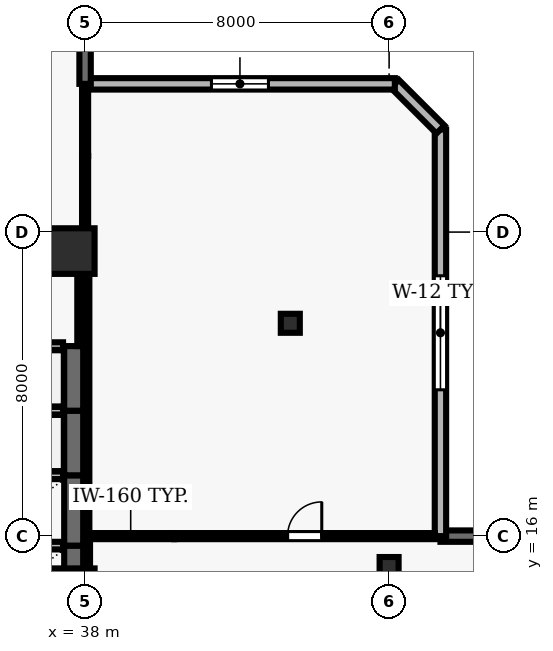
"""IFC4 building model, lengths in metres.
Left out: names, types, materials, properties, quantities, classifications, styles, units other than length and angle.
Written with IfcOpenShell. Run it as: python <this file> out.ifc"""

import sys

from ifc_helpers import new_model, si_unit, direction, frame, frame_2d, origin, origin_2d, place, context, subcontext, project, spatial, rectangle, hollow_rectangle, extrude, element, fill, save


model = new_model("IFC4")
c1 = context("Model", 3, precision=1e-05, world=origin(), true_north=direction((0.0, 1.0)))
c2 = subcontext(c1, "Body", "Model", "MODEL_VIEW")
j1 = project(units=[si_unit("LENGTHUNIT", "METRE"), si_unit("PLANEANGLEUNIT", "RADIAN")], contexts=[c1])
p1 = place(None, origin())
s1 = spatial("IfcSite", under=j1, at=p1, CompositionType="ELEMENT")
p2 = place(p1, origin())
s2 = spatial("IfcBuilding", under=s1, at=p2, CompositionType="ELEMENT")
p3 = place(p2, frame((0.0, 0.0, 126.8)))
s3 = spatial("IfcBuildingStorey", under=s2, at=p3, CompositionType="ELEMENT", Elevation=126.8)
for number, where, z_axis, x_axis in (
    (1, (37.65, 14.55, 0.0), (0.0, 0.0, 1.0), (1.0, 0.0, 0.0)),
    (2, (37.65, 23.5, 0.0), (0.0, 0.0, 1.0), (1.0, 0.0, 0.0)),
):
    element("IfcColumn", number, at=place(p3, frame(where, z_axis=z_axis, x_axis=x_axis)), inside=s3, PredefinedType="COLUMN", context=c2, shape_type="SweptSolid", body=[
        extrude(rectangle(XDim=1.2, YDim=1.2, at=origin_2d()), origin(), (0.0, 0.0, 1.0), 3.9),
    ])
for number, where, z_axis, x_axis in (
    (3, (46.0, 15.2, 0.0), (0.0, 0.0, 1.0), (1.0, 0.0, 0.0)),
    (4, (43.4, 21.6, 0.0), (0.0, 0.0, 1.0), (1.0, 0.0, 0.0)),
):
    element("IfcColumn", number, at=place(p3, frame(where, z_axis=z_axis, x_axis=x_axis)), inside=s3, PredefinedType="COLUMN", context=c2, shape_type="SweptSolid", body=[
        extrude(hollow_rectangle(XDim=0.5, YDim=0.5, WallThickness=0.025, at=origin_2d()), origin(), (0.0, 0.0, 1.0), 3.9),
    ])
p4 = place(p3, frame((68.1, 16.0, 0.0), z_axis=(0.0, 0.0, 1.0), x_axis=(-1.0, 0.0, 0.0)))
e5 = element("IfcWall", 5, at=p4, inside=s3, PredefinedType="SOLIDWALL", context=c2, shape_type="SweptSolid", body=[
    extrude(rectangle(XDim=20.749, YDim=0.3, at=frame_2d((10.375, 0.0))), origin(), (0.0, 0.0, 1.0), 3.69),
])
p5 = place(p4, frame((11.974, 0.0, 0.0)))
e6 = element("IfcOpeningElement", 6, at=p5, cuts=e5, PredefinedType="OPENING", context=c2, shape_type="SweptSolid", body=[
    extrude(rectangle(XDim=1.0, YDim=2.2, at=frame_2d((0.5, 1.1))), frame((0.0, 0.16, 0.0), z_axis=(0.0, -1.0, 0.0), x_axis=(1.0, 0.0, 0.0)), (0.0, 0.0, 1.0), 0.32),
])
p6 = place(p4, frame((2.258, 0.0, 0.9)))
e7 = element("IfcOpeningElement", 7, at=p6, cuts=e5, PredefinedType="OPENING", context=c2, shape_type="SweptSolid", body=[
    extrude(rectangle(XDim=2.4, YDim=2.2, at=frame_2d((1.2, 1.1))), frame((0.0, 0.16, 0.0), z_axis=(0.0, -1.0, 0.0), x_axis=(1.0, 0.0, 0.0)), (0.0, 0.0, 1.0), 0.32),
])
p7 = place(p4, frame((9.174, 0.0, 0.9)))
e8 = element("IfcOpeningElement", 8, at=p7, cuts=e5, PredefinedType="OPENING", context=c2, shape_type="SweptSolid", body=[
    extrude(rectangle(XDim=2.4, YDim=2.2, at=frame_2d((1.2, 1.1))), frame((0.0, 0.16, 0.0), z_axis=(0.0, -1.0, 0.0), x_axis=(1.0, 0.0, 0.0)), (0.0, 0.0, 1.0), 0.32),
])
p8 = place(p4, frame((16.091, 0.0, 0.9)))
e9 = element("IfcOpeningElement", 9, at=p8, cuts=e5, PredefinedType="OPENING", context=c2, shape_type="SweptSolid", body=[
    extrude(rectangle(XDim=2.4, YDim=2.2, at=frame_2d((1.2, 1.1))), frame((0.0, 0.16, 0.0), z_axis=(0.0, -1.0, 0.0), x_axis=(1.0, 0.0, 0.0)), (0.0, 0.0, 1.0), 0.32),
])
p9 = place(p3, frame((47.351, 16.0, 0.0), z_axis=(0.0, 0.0, 1.0), x_axis=(0.0, 1.0, 0.0)))
e10 = element("IfcWall", 10, at=p9, inside=s3, PredefinedType="SOLIDWALL", context=c2, shape_type="SweptSolid", body=[
    extrude(rectangle(XDim=10.7, YDim=0.3, at=frame_2d((5.35, 0.0))), origin(), (0.0, 0.0, 1.0), 3.69),
])
p10 = place(p9, frame((3.85, 0.0, 0.9)))
e11 = element("IfcOpeningElement", 11, at=p10, cuts=e10, PredefinedType="OPENING", context=c2, shape_type="SweptSolid", body=[
    extrude(rectangle(XDim=3.0, YDim=2.2, at=frame_2d((1.5, 1.1))), frame((0.0, 0.16, 0.0), z_axis=(0.0, -1.0, 0.0), x_axis=(1.0, 0.0, 0.0)), (0.0, 0.0, 1.0), 0.32),
])
p11 = place(p3, frame((47.351, 26.7, 0.0), z_axis=(0.0, 0.0, 1.0), x_axis=(-0.707178703759, 0.707034851297, 0.0)))
e12 = element("IfcWall", 12, at=p11, inside=s3, PredefinedType="SOLIDWALL", context=c2, shape_type="SweptSolid", body=[
    extrude(rectangle(XDim=1.697, YDim=0.3, at=frame_2d((0.849, 0.0))), origin(), (0.0, 0.0, 1.0), 3.69),
])
p12 = place(p3, frame((46.151, 27.9, 0.0), z_axis=(0.0, 0.0, 1.0), x_axis=(-1.0, 0.0, 0.0)))
e13 = element("IfcWall", 13, at=p12, inside=s3, PredefinedType="SOLIDWALL", context=c2, shape_type="SweptSolid", body=[
    extrude(rectangle(XDim=8.151, YDim=0.3, at=frame_2d((4.075, 0.0))), origin(), (0.0, 0.0, 1.0), 3.69),
])
p13 = place(p12, frame((3.326, 0.0, 0.9)))
e14 = element("IfcOpeningElement", 14, at=p13, cuts=e13, PredefinedType="OPENING", context=c2, shape_type="SweptSolid", body=[
    extrude(rectangle(XDim=1.5, YDim=1.6, at=frame_2d((0.75, 0.8))), frame((0.0, 0.16, 0.0), z_axis=(0.0, -1.0, 0.0), x_axis=(1.0, 0.0, 0.0)), (0.0, 0.0, 1.0), 0.32),
])
p14 = place(p3, frame((38.0, 27.9, 0.0), z_axis=(0.0, 0.0, 1.0), x_axis=(0.0, 1.0, 0.0)))
e15 = element("IfcWall", 15, at=p14, inside=s3, PredefinedType="SOLIDWALL", context=c2, shape_type="SweptSolid", body=[
    extrude(rectangle(XDim=18.2, YDim=0.3, at=frame_2d((9.1, 0.0))), origin(), (0.0, 0.0, 1.0), 3.69),
])
p15 = place(p14, frame((9.8, 0.0, 0.0)))
e16 = element("IfcOpeningElement", 16, at=p15, cuts=e15, PredefinedType="OPENING", context=c2, shape_type="SweptSolid", body=[
    extrude(rectangle(XDim=1.0, YDim=2.2, at=frame_2d((0.5, 1.1))), frame((0.0, 0.16, 0.0), z_axis=(0.0, -1.0, 0.0), x_axis=(1.0, 0.0, 0.0)), (0.0, 0.0, 1.0), 0.32),
])
p16 = place(p14, frame((3.033, 0.0, 0.9)))
e17 = element("IfcOpeningElement", 17, at=p16, cuts=e15, PredefinedType="OPENING", context=c2, shape_type="SweptSolid", body=[
    extrude(rectangle(XDim=1.8, YDim=1.6, at=frame_2d((0.9, 0.8))), frame((0.0, 0.16, 0.0), z_axis=(0.0, -1.0, 0.0), x_axis=(1.0, 0.0, 0.0)), (0.0, 0.0, 1.0), 0.32),
])
p17 = place(p14, frame((14.267, 0.0, 0.9)))
e18 = element("IfcOpeningElement", 18, at=p17, cuts=e15, PredefinedType="OPENING", context=c2, shape_type="SweptSolid", body=[
    extrude(rectangle(XDim=1.8, YDim=1.6, at=frame_2d((0.9, 0.8))), frame((0.0, 0.16, 0.0), z_axis=(0.0, -1.0, 0.0), x_axis=(1.0, 0.0, 0.0)), (0.0, 0.0, 1.0), 0.32),
])
p18 = place(p3, frame((37.7, 13.9, 0.0), z_axis=(0.0, 0.0, 1.0), x_axis=(0.0, 1.0, 0.0)))
e19 = element("IfcWall", 19, at=p18, inside=s3, PredefinedType="SHEAR", context=c2, shape_type="SweptSolid", body=[
    extrude(rectangle(XDim=1.85, YDim=0.5, at=frame_2d((0.925, 0.0))), origin(), (0.0, 0.0, 1.0), 3.69),
])
p19 = place(p3, frame((37.42, 15.75, 0.0), z_axis=(0.0, 0.0, 1.0), x_axis=(-1.0, 0.0, 0.0)))
e20 = element("IfcWall", 20, at=p19, inside=s3, PredefinedType="SOLIDWALL", context=c2, shape_type="SweptSolid", body=[
    extrude(rectangle(XDim=2.14, YDim=0.2, at=frame_2d((1.07, 0.0))), origin(), (0.0, 0.0, 1.0), 3.69),
])
p20 = place(p3, frame((37.7, 15.75, 0.0), z_axis=(0.0, 0.0, 1.0), x_axis=(0.0, 1.0, 0.0)))
e21 = element("IfcWall", 21, at=p20, inside=s3, PredefinedType="SHEAR", context=c2, shape_type="SweptSolid", body=[
    extrude(rectangle(XDim=1.85, YDim=0.5, at=frame_2d((0.925, 0.0))), origin(), (0.0, 0.0, 1.0), 3.69),
])
p21 = place(p3, frame((37.42, 17.6, 0.0), z_axis=(0.0, 0.0, 1.0), x_axis=(-1.0, 0.0, 0.0)))
e22 = element("IfcWall", 22, at=p21, inside=s3, PredefinedType="SOLIDWALL", context=c2, shape_type="SweptSolid", body=[
    extrude(rectangle(XDim=2.14, YDim=0.2, at=frame_2d((1.07, 0.0))), origin(), (0.0, 0.0, 1.0), 3.69),
])
p22 = place(p3, frame((37.7, 17.6, 0.0), z_axis=(0.0, 0.0, 1.0), x_axis=(0.0, 1.0, 0.0)))
e23 = element("IfcWall", 23, at=p22, inside=s3, PredefinedType="SHEAR", context=c2, shape_type="SweptSolid", body=[
    extrude(rectangle(XDim=1.7, YDim=0.5, at=frame_2d((0.85, 0.0))), origin(), (0.0, 0.0, 1.0), 3.69),
])
p23 = place(p3, frame((37.42, 19.3, 0.0), z_axis=(0.0, 0.0, 1.0), x_axis=(-1.0, 0.0, 0.0)))
e24 = element("IfcWall", 24, at=p23, inside=s3, PredefinedType="SOLIDWALL", context=c2, shape_type="SweptSolid", body=[
    extrude(rectangle(XDim=2.14, YDim=0.2, at=frame_2d((1.07, 0.0))), origin(), (0.0, 0.0, 1.0), 3.69),
])
p24 = place(p3, frame((37.7, 19.3, 0.0), z_axis=(0.0, 0.0, 1.0), x_axis=(0.0, 1.0, 0.0)))
e25 = element("IfcWall", 25, at=p24, inside=s3, PredefinedType="SHEAR", context=c2, shape_type="SweptSolid", body=[
    extrude(rectangle(XDim=1.7, YDim=0.5, at=frame_2d((0.85, 0.0))), origin(), (0.0, 0.0, 1.0), 3.69),
])
p25 = place(p3, frame((37.42, 21.0, 0.0), z_axis=(0.0, 0.0, 1.0), x_axis=(-1.0, 0.0, 0.0)))
e26 = element("IfcWall", 26, at=p25, inside=s3, PredefinedType="SOLIDWALL", context=c2, shape_type="SweptSolid", body=[
    extrude(rectangle(XDim=2.14, YDim=0.2, at=frame_2d((1.07, 0.0))), origin(), (0.0, 0.0, 1.0), 3.69),
])
p26 = place(p3, frame((37.85, 23.85, 0.0), z_axis=(0.0, 0.0, 1.0), x_axis=(-1.0, 0.0, 0.0)))
e27 = element("IfcWall", 27, at=p26, inside=s3, PredefinedType="PARTITIONING", context=c2, shape_type="SweptSolid", body=[
    extrude(rectangle(XDim=4.0, YDim=0.16, at=frame_2d((2.0, 0.0))), origin(), (0.0, 0.0, 1.0), 3.074),
])
p27 = place(p26, frame((2.25, 0.0, 0.0)))
e28 = element("IfcOpeningElement", 28, at=p27, cuts=e27, PredefinedType="OPENING", context=c2, shape_type="SweptSolid", body=[
    extrude(rectangle(XDim=0.9, YDim=2.1, at=frame_2d((0.45, 1.05))), frame((0.0, 0.09, 0.0), z_axis=(0.0, -1.0, 0.0), x_axis=(1.0, 0.0, 0.0)), (0.0, 0.0, 1.0), 0.18),
])
p28 = place(p3, frame((40.35, 16.0, 0.0), z_axis=(0.0, 0.0, 1.0), x_axis=(-1.0, 0.0, 0.0)))
e29 = element("IfcWall", 29, at=p28, inside=s3, PredefinedType="PARTITIONING", context=c2, shape_type="SweptSolid", body=[
    extrude(rectangle(XDim=2.3, YDim=0.16, at=frame_2d((1.15, 0.0))), origin(), (0.0, 0.0, 1.0), 3.69),
])
p29 = place(p3, frame((40.35, 16.0, 0.0), z_axis=(0.0, 0.0, 1.0), x_axis=(1.0, 0.0, 0.0)))
e30 = element("IfcWall", 30, at=p29, inside=s3, PredefinedType="PARTITIONING", context=c2, shape_type="SweptSolid", body=[
    extrude(rectangle(XDim=6.856, YDim=0.16, at=frame_2d((3.428, 0.0))), origin(), (0.0, 0.0, 1.0), 3.39),
])
p30 = place(p29, frame((2.978, 0.0, 0.0)))
e31 = element("IfcOpeningElement", 31, at=p30, cuts=e30, PredefinedType="OPENING", context=c2, shape_type="SweptSolid", body=[
    extrude(rectangle(XDim=0.9, YDim=2.1, at=frame_2d((0.45, 1.05))), frame((0.0, 0.09, 0.0), z_axis=(0.0, -1.0, 0.0), x_axis=(1.0, 0.0, 0.0)), (0.0, 0.0, 1.0), 0.18),
])
p31 = place(p3, frame((37.85, 21.0, 0.0), z_axis=(0.0, 0.0, 1.0), x_axis=(0.0, 1.0, 0.0)))
e32 = element("IfcWall", 32, at=p31, inside=s3, PredefinedType="MOVABLE", context=c2, shape_type="SweptSolid", body=[
    extrude(rectangle(XDim=2.775, YDim=0.11, at=frame_2d((1.387, 0.0))), origin(), (0.0, 0.0, 1.0), 3.074),
])
p32 = place(p3, frame((38.0, 23.85, 0.0), z_axis=(0.0, 0.0, 1.0), x_axis=(0.0, 1.0, 0.0)))
e33 = element("IfcWall", 33, at=p32, inside=s3, PredefinedType="PARTITIONING", context=c2, shape_type="SweptSolid", body=[
    extrude(rectangle(XDim=2.15, YDim=0.16, at=frame_2d((1.075, 0.0))), origin(), (0.0, 0.0, 1.0), 3.074),
])
p33 = place(p3, frame((38.0, 26.0, 0.0), z_axis=(0.0, 0.0, 1.0), x_axis=(0.0, 1.0, 0.0)))
e34 = element("IfcWall", 34, at=p33, inside=s3, PredefinedType="PARTITIONING", context=c2, shape_type="SweptSolid", body=[
    extrude(rectangle(XDim=1.755, YDim=0.16, at=frame_2d((0.877, 0.0))), origin(), (0.0, 0.0, 1.0), 3.074),
])
p34 = place(p3, frame((38.05, 15.925, 0.0), z_axis=(0.0, 0.0, 1.0), x_axis=(0.0, -1.0, 0.0)))
e35 = element("IfcWall", 35, at=p34, inside=s3, PredefinedType="PARTITIONING", context=c2, shape_type="SweptSolid", body=[
    extrude(rectangle(XDim=6.375, YDim=0.16, at=frame_2d((3.188, 0.0))), origin(), (0.0, 0.0, 1.0), 3.074),
])
p35 = place(p3, frame((38.05, 23.85, 0.0), z_axis=(0.0, 0.0, 1.0), x_axis=(0.0, -1.0, 0.0)))
e36 = element("IfcWall", 36, at=p35, inside=s3, PredefinedType="PARTITIONING", context=c2, shape_type="SweptSolid", body=[
    extrude(rectangle(XDim=7.775, YDim=0.125, at=frame_2d((3.888, 0.0))), origin(), (0.0, 0.0, 1.0), 3.074),
])
p36 = place(p10, origin())
e37 = element("IfcWindow", 37, at=p36, inside=s3, PartitioningType="SINGLE_PANEL", PredefinedType="WINDOW", context=c2, shape_type="SweptSolid", body=[
    extrude(rectangle(XDim=3.0, YDim=2.2, at=frame_2d((1.5, 1.1))), frame((0.0, 0.03, 0.0), z_axis=(0.0, -1.0, 0.0), x_axis=(1.0, 0.0, 0.0)), (0.0, 0.0, 1.0), 0.06),
])
fill(e11, e37)
p37 = place(p13, origin())
e38 = element("IfcWindow", 38, at=p37, inside=s3, PartitioningType="SINGLE_PANEL", PredefinedType="WINDOW", context=c2, shape_type="SweptSolid", body=[
    extrude(rectangle(XDim=1.5, YDim=1.6, at=frame_2d((0.75, 0.8))), frame((0.0, 0.03, 0.0), z_axis=(0.0, -1.0, 0.0), x_axis=(1.0, 0.0, 0.0)), (0.0, 0.0, 1.0), 0.06),
])
fill(e14, e38)
p38 = place(p30, origin())
e39 = element("IfcDoor", 39, at=p38, inside=s3, OperationType="SINGLE_SWING_RIGHT", PredefinedType="DOOR", context=c2, shape_type="SweptSolid", body=[
    extrude(rectangle(XDim=0.9, YDim=2.1, at=frame_2d((0.45, 1.05))), frame((0.0, 0.025, 0.0), z_axis=(0.0, -1.0, 0.0), x_axis=(1.0, 0.0, 0.0)), (0.0, 0.0, 1.0), 0.05),
])
fill(e31, e39)
save(model, sys.argv[1])
